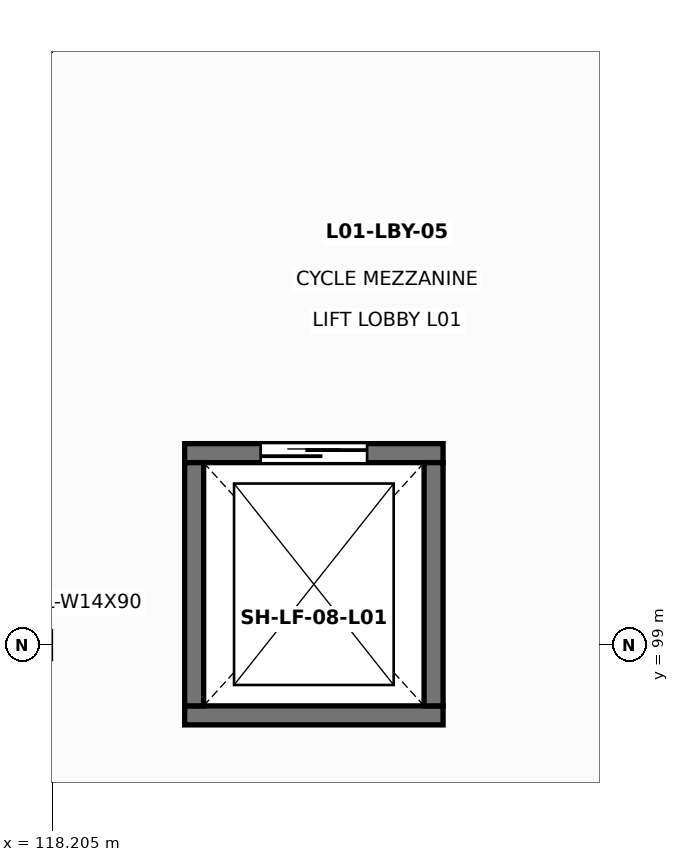
"""IFC4 building model, lengths in metres.
Left out: names, types, materials, properties, quantities, classifications, styles, units other than length and angle.
Written with IfcOpenShell. Run it as: python <this file> out.ifc"""

import sys

from ifc_helpers import new_model, si_unit, direction, frame, frame_2d, origin, place, context, subcontext, project, spatial, rectangle, extrude, element, fill, save


model = new_model("IFC4")
c1 = context("Model", 3, precision=1e-05, world=origin(), true_north=direction((0.0, 1.0)))
c2 = subcontext(c1, "Body", "Model", "MODEL_VIEW")
j1 = project(units=[si_unit("LENGTHUNIT", "METRE"), si_unit("PLANEANGLEUNIT", "RADIAN")], contexts=[c1])
p1 = place(None, origin())
s1 = spatial("IfcSite", under=j1, at=p1, CompositionType="ELEMENT")
p2 = place(p1, origin())
s2 = spatial("IfcBuilding", under=s1, at=p2, CompositionType="ELEMENT")
p3 = place(p2, frame((0.0, 0.0, 6.0)))
s3 = spatial("IfcBuildingStorey", under=s2, at=p3, CompositionType="ELEMENT", Elevation=6.0)
p4 = place(p3, frame((119.95, 98.075, 0.0), z_axis=(0.0, 0.0, 1.0), x_axis=(1.0, 0.0, 0.0)))
e1 = element("IfcWall", 1, at=p4, inside=s3, PredefinedType="SOLIDWALL", context=c2, shape_type="SweptSolid", body=[
    extrude(rectangle(XDim=3.4, YDim=0.25, at=frame_2d((1.7, 0.0))), origin(), (0.0, 0.0, 1.0), 4.945),
])
p5 = place(p3, frame((123.35, 101.525, 0.0), z_axis=(0.0, 0.0, 1.0), x_axis=(-1.0, 0.0, 0.0)))
e2 = element("IfcWall", 2, at=p5, inside=s3, PredefinedType="SOLIDWALL", context=c2, shape_type="SweptSolid", body=[
    extrude(rectangle(XDim=3.4, YDim=0.25, at=frame_2d((1.7, 0.0))), origin(), (0.0, 0.0, 1.0), 4.945),
])
p6 = place(p5, frame((1.0, 0.0, 0.0)))
e3 = element("IfcOpeningElement", 3, at=p6, cuts=e2, PredefinedType="OPENING", context=c2, shape_type="SweptSolid", body=[
    extrude(rectangle(XDim=1.4, YDim=2.25, at=frame_2d((0.7, 1.125))), frame((0.0, 0.135, 0.0), z_axis=(0.0, -1.0, 0.0), x_axis=(1.0, 0.0, 0.0)), (0.0, 0.0, 1.0), 0.27),
])
for number, where, z_axis, x_axis in (
    (4, (123.225, 98.2, 0.0), (0.0, 0.0, 1.0), (0.0, 1.0, 0.0)),
    (5, (120.075, 101.4, 0.0), (0.0, 0.0, 1.0), (0.0, -1.0, 0.0)),
):
    element("IfcWall", number, at=place(p3, frame(where, z_axis=z_axis, x_axis=x_axis)), inside=s3, PredefinedType="SOLIDWALL", context=c2, shape_type="SweptSolid", body=[
        extrude(rectangle(XDim=3.2, YDim=0.25, at=frame_2d((1.6, 0.0))), origin(), (0.0, 0.0, 1.0), 4.945),
    ])
p7 = place(p6, frame((1.4, 0.0, 0.0), z_axis=(0.0, 0.0, 1.0), x_axis=(-1.0, 0.0, 0.0)))
e6 = element("IfcDoor", 6, at=p7, inside=s3, OperationType="DOUBLE_DOOR_SLIDING", PredefinedType="DOOR", context=c2, shape_type="SweptSolid", body=[
    extrude(rectangle(XDim=1.4, YDim=2.25, at=frame_2d((0.7, 1.125))), frame((0.0, 0.025, 0.0), z_axis=(0.0, -1.0, 0.0), x_axis=(1.0, 0.0, 0.0)), (0.0, 0.0, 1.0), 0.05),
])
fill(e3, e6)
save(model, sys.argv[1])
